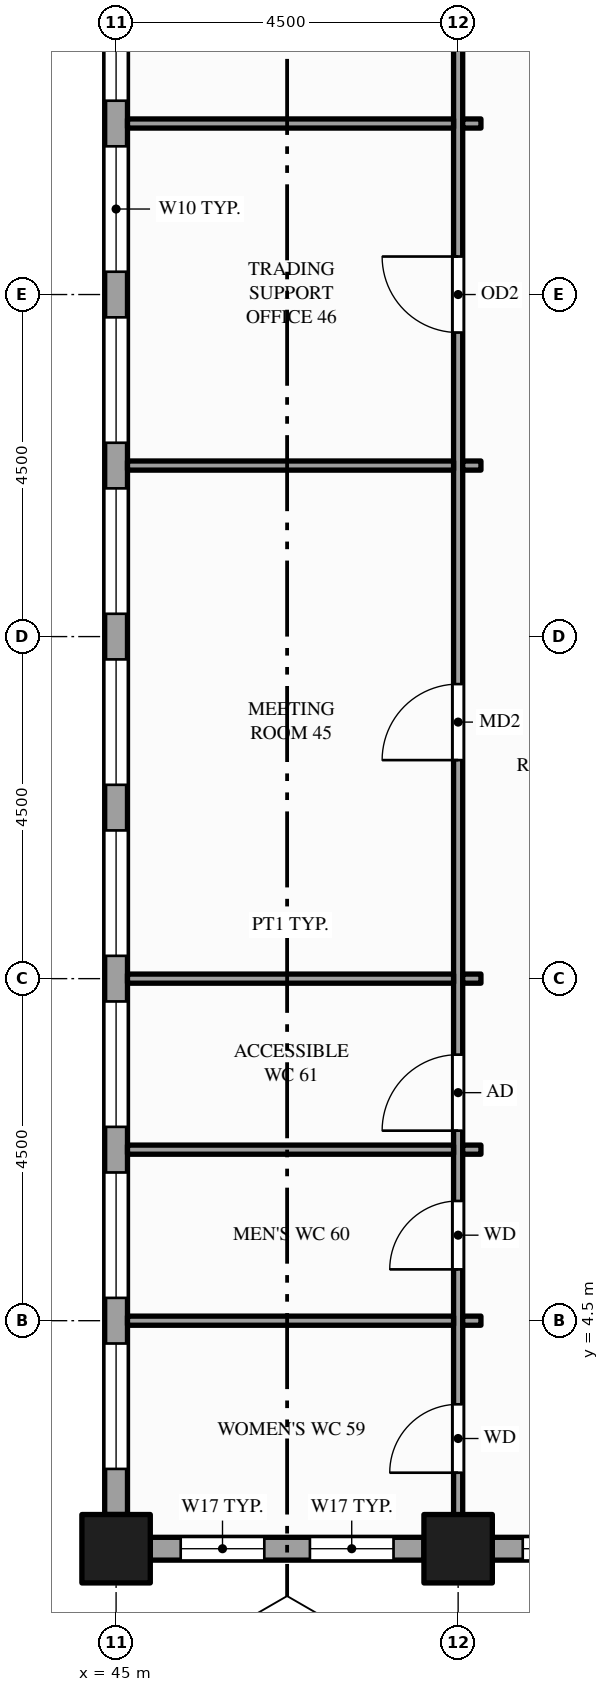
"""IFC4 building model, lengths in metres.
Left out: names, types, materials, properties, quantities, classifications, styles, units other than length and angle.
Written with IfcOpenShell. Run it as: python <this file> out.ifc"""

import sys

from ifc_helpers import new_model, si_unit, direction, frame, frame_2d, origin, origin_2d, place, context, subcontext, project, spatial, rectangle, hollow_rectangle, extrude, element, fill, save


model = new_model("IFC4")
c1 = context("Model", 3, precision=1e-05, world=origin(), true_north=direction((0.0, 1.0)))
c2 = subcontext(c1, "Body", "Model", "MODEL_VIEW")
j1 = project(units=[si_unit("LENGTHUNIT", "METRE"), si_unit("PLANEANGLEUNIT", "RADIAN")], contexts=[c1])
p1 = place(None, origin())
s1 = spatial("IfcSite", under=j1, at=p1, CompositionType="ELEMENT")
p2 = place(p1, origin())
s2 = spatial("IfcBuilding", under=s1, at=p2, CompositionType="ELEMENT")
p3 = place(p2, frame((0.0, 0.0, 139.0)))
s3 = spatial("IfcBuildingStorey", under=s2, at=p3, CompositionType="ELEMENT", Elevation=139.0)
for number, where, z_axis, x_axis in (
    (1, (45.0, 1.5, -0.15), (0.0, 0.0, 1.0), (1.0, 0.0, 0.0)),
    (2, (49.5, 1.5, -0.15), (0.0, 0.0, 1.0), (1.0, 0.0, 0.0)),
):
    element("IfcColumn", number, at=place(p3, frame(where, z_axis=z_axis, x_axis=x_axis)), inside=s3, PredefinedType="COLUMN", context=c2, shape_type="SweptSolid", body=[
        extrude(hollow_rectangle(XDim=0.9, YDim=0.9, WallThickness=0.045, at=origin_2d()), origin(), (0.0, 0.0, 1.0), 4.0),
    ])
p4 = place(p3, frame((45.45, 1.5, 0.0), z_axis=(0.0, 0.0, 1.0), x_axis=(1.0, 0.0, 0.0)))
e3 = element("IfcWall", 3, at=p4, inside=s3, PredefinedType="STANDARD", context=c2, shape_type="SweptSolid", body=[
    extrude(rectangle(XDim=3.6, YDim=0.3, at=frame_2d((1.8, 0.0))), origin(), (0.0, 0.0, 1.0), 2.87),
])
p5 = place(p4, frame((0.4, 0.0, 0.9)))
e4 = element("IfcOpeningElement", 4, at=p5, cuts=e3, PredefinedType="OPENING", context=c2, shape_type="SweptSolid", body=[
    extrude(rectangle(XDim=1.1, YDim=1.75, at=frame_2d((0.55, 0.875))), frame((0.0, 0.16, 0.0), z_axis=(0.0, -1.0, 0.0), x_axis=(1.0, 0.0, 0.0)), (0.0, 0.0, 1.0), 0.32),
])
p6 = place(p4, frame((2.1, 0.0, 0.9)))
e5 = element("IfcOpeningElement", 5, at=p6, cuts=e3, PredefinedType="OPENING", context=c2, shape_type="SweptSolid", body=[
    extrude(rectangle(XDim=1.1, YDim=1.75, at=frame_2d((0.55, 0.875))), frame((0.0, 0.16, 0.0), z_axis=(0.0, -1.0, 0.0), x_axis=(1.0, 0.0, 0.0)), (0.0, 0.0, 1.0), 0.32),
])
p7 = place(p3, frame((49.95, 1.5, 0.0), z_axis=(0.0, 0.0, 1.0), x_axis=(1.0, 0.0, 0.0)))
e6 = element("IfcWall", 6, at=p7, inside=s3, PredefinedType="STANDARD", context=c2, shape_type="SweptSolid", body=[
    extrude(rectangle(XDim=4.05, YDim=0.3, at=frame_2d((2.025, 0.0))), origin(), (0.0, 0.0, 1.0), 2.87),
])
p8 = place(p7, frame((0.4, 0.0, 0.9)))
e7 = element("IfcOpeningElement", 7, at=p8, cuts=e6, PredefinedType="OPENING", context=c2, shape_type="SweptSolid", body=[
    extrude(rectangle(XDim=1.1, YDim=1.75, at=frame_2d((0.55, 0.875))), frame((0.0, 0.16, 0.0), z_axis=(0.0, -1.0, 0.0), x_axis=(1.0, 0.0, 0.0)), (0.0, 0.0, 1.0), 0.32),
])
p9 = place(p7, frame((2.1, 0.0, 0.9)))
e8 = element("IfcOpeningElement", 8, at=p9, cuts=e6, PredefinedType="OPENING", context=c2, shape_type="SweptSolid", body=[
    extrude(rectangle(XDim=1.55, YDim=1.75, at=frame_2d((0.775, 0.875))), frame((0.0, 0.16, 0.0), z_axis=(0.0, -1.0, 0.0), x_axis=(1.0, 0.0, 0.0)), (0.0, 0.0, 1.0), 0.32),
])
p10 = place(p3, frame((45.0, 23.55, 0.0), z_axis=(0.0, 0.0, 1.0), x_axis=(0.0, -1.0, 0.0)))
e9 = element("IfcWall", 9, at=p10, inside=s3, PredefinedType="STANDARD", context=c2, shape_type="SweptSolid", body=[
    extrude(rectangle(XDim=21.6, YDim=0.3, at=frame_2d((10.8, 0.0))), origin(), (0.0, 0.0, 1.0), 3.149),
])
p11 = place(p10, frame((1.35, 0.0, 0.9)))
e10 = element("IfcOpeningElement", 10, at=p11, cuts=e9, PredefinedType="OPENING", context=c2, shape_type="SweptSolid", body=[
    extrude(rectangle(XDim=1.65, YDim=2.0, at=frame_2d((0.825, 1.0))), frame((0.0, 0.16, 0.0), z_axis=(0.0, -1.0, 0.0), x_axis=(1.0, 0.0, 0.0)), (0.0, 0.0, 1.0), 0.32),
])
p12 = place(p10, frame((3.6, 0.0, 0.9)))
e11 = element("IfcOpeningElement", 11, at=p12, cuts=e9, PredefinedType="OPENING", context=c2, shape_type="SweptSolid", body=[
    extrude(rectangle(XDim=1.65, YDim=2.0, at=frame_2d((0.825, 1.0))), frame((0.0, 0.16, 0.0), z_axis=(0.0, -1.0, 0.0), x_axis=(1.0, 0.0, 0.0)), (0.0, 0.0, 1.0), 0.32),
])
p13 = place(p10, frame((5.85, 0.0, 0.9)))
e12 = element("IfcOpeningElement", 12, at=p13, cuts=e9, PredefinedType="OPENING", context=c2, shape_type="SweptSolid", body=[
    extrude(rectangle(XDim=1.65, YDim=2.0, at=frame_2d((0.825, 1.0))), frame((0.0, 0.16, 0.0), z_axis=(0.0, -1.0, 0.0), x_axis=(1.0, 0.0, 0.0)), (0.0, 0.0, 1.0), 0.32),
])
p14 = place(p10, frame((8.1, 0.0, 0.9)))
e13 = element("IfcOpeningElement", 13, at=p14, cuts=e9, PredefinedType="OPENING", context=c2, shape_type="SweptSolid", body=[
    extrude(rectangle(XDim=1.65, YDim=2.0, at=frame_2d((0.825, 1.0))), frame((0.0, 0.16, 0.0), z_axis=(0.0, -1.0, 0.0), x_axis=(1.0, 0.0, 0.0)), (0.0, 0.0, 1.0), 0.32),
])
p15 = place(p10, frame((10.35, 0.0, 0.9)))
e14 = element("IfcOpeningElement", 14, at=p15, cuts=e9, PredefinedType="OPENING", context=c2, shape_type="SweptSolid", body=[
    extrude(rectangle(XDim=1.65, YDim=2.0, at=frame_2d((0.825, 1.0))), frame((0.0, 0.16, 0.0), z_axis=(0.0, -1.0, 0.0), x_axis=(1.0, 0.0, 0.0)), (0.0, 0.0, 1.0), 0.32),
])
p16 = place(p10, frame((12.6, 0.0, 0.9)))
e15 = element("IfcOpeningElement", 15, at=p16, cuts=e9, PredefinedType="OPENING", context=c2, shape_type="SweptSolid", body=[
    extrude(rectangle(XDim=1.65, YDim=2.0, at=frame_2d((0.825, 1.0))), frame((0.0, 0.16, 0.0), z_axis=(0.0, -1.0, 0.0), x_axis=(1.0, 0.0, 0.0)), (0.0, 0.0, 1.0), 0.32),
])
p17 = place(p10, frame((14.85, 0.0, 0.9)))
e16 = element("IfcOpeningElement", 16, at=p17, cuts=e9, PredefinedType="OPENING", context=c2, shape_type="SweptSolid", body=[
    extrude(rectangle(XDim=1.65, YDim=2.0, at=frame_2d((0.825, 1.0))), frame((0.0, 0.16, 0.0), z_axis=(0.0, -1.0, 0.0), x_axis=(1.0, 0.0, 0.0)), (0.0, 0.0, 1.0), 0.32),
])
p18 = place(p10, frame((17.1, 0.0, 0.9)))
e17 = element("IfcOpeningElement", 17, at=p18, cuts=e9, PredefinedType="OPENING", context=c2, shape_type="SweptSolid", body=[
    extrude(rectangle(XDim=1.65, YDim=2.0, at=frame_2d((0.825, 1.0))), frame((0.0, 0.16, 0.0), z_axis=(0.0, -1.0, 0.0), x_axis=(1.0, 0.0, 0.0)), (0.0, 0.0, 1.0), 0.32),
])
p19 = place(p10, frame((19.35, 0.0, 0.9)))
e18 = element("IfcOpeningElement", 18, at=p19, cuts=e9, PredefinedType="OPENING", context=c2, shape_type="SweptSolid", body=[
    extrude(rectangle(XDim=1.65, YDim=2.0, at=frame_2d((0.825, 1.0))), frame((0.0, 0.16, 0.0), z_axis=(0.0, -1.0, 0.0), x_axis=(1.0, 0.0, 0.0)), (0.0, 0.0, 1.0), 0.32),
])
p20 = place(p3, frame((49.5, 1.65, 0.0), z_axis=(0.0, 0.0, 1.0), x_axis=(0.0, 1.0, 0.0)))
e19 = element("IfcWall", 19, at=p20, inside=s3, PredefinedType="PARTITIONING", context=c2, shape_type="SweptSolid", body=[
    extrude(rectangle(XDim=22.2, YDim=0.12, at=frame_2d((11.1, 0.0))), origin(), (0.0, 0.0, 1.0), 2.87),
])
p21 = place(p20, frame((0.85, 0.0, 0.0)))
e20 = element("IfcOpeningElement", 20, at=p21, cuts=e19, PredefinedType="OPENING", context=c2, shape_type="SweptSolid", body=[
    extrude(rectangle(XDim=0.9, YDim=2.1, at=frame_2d((0.45, 1.05))), frame((0.0, 0.07, 0.0), z_axis=(0.0, -1.0, 0.0), x_axis=(1.0, 0.0, 0.0)), (0.0, 0.0, 1.0), 0.14),
])
p22 = place(p20, frame((3.525, 0.0, 0.0)))
e21 = element("IfcOpeningElement", 21, at=p22, cuts=e19, PredefinedType="OPENING", context=c2, shape_type="SweptSolid", body=[
    extrude(rectangle(XDim=0.9, YDim=2.1, at=frame_2d((0.45, 1.05))), frame((0.0, 0.07, 0.0), z_axis=(0.0, -1.0, 0.0), x_axis=(1.0, 0.0, 0.0)), (0.0, 0.0, 1.0), 0.14),
])
p23 = place(p20, frame((5.35, 0.0, 0.0)))
e22 = element("IfcOpeningElement", 22, at=p23, cuts=e19, PredefinedType="OPENING", context=c2, shape_type="SweptSolid", body=[
    extrude(rectangle(XDim=1.0, YDim=2.1, at=frame_2d((0.5, 1.05))), frame((0.0, 0.07, 0.0), z_axis=(0.0, -1.0, 0.0), x_axis=(1.0, 0.0, 0.0)), (0.0, 0.0, 1.0), 0.14),
])
p24 = place(p20, frame((10.225, 0.0, 0.0)))
e23 = element("IfcOpeningElement", 23, at=p24, cuts=e19, PredefinedType="OPENING", context=c2, shape_type="SweptSolid", body=[
    extrude(rectangle(XDim=1.0, YDim=2.1, at=frame_2d((0.5, 1.05))), frame((0.0, 0.07, 0.0), z_axis=(0.0, -1.0, 0.0), x_axis=(1.0, 0.0, 0.0)), (0.0, 0.0, 1.0), 0.14),
])
p25 = place(p20, frame((15.85, 0.0, 0.0)))
e24 = element("IfcOpeningElement", 24, at=p25, cuts=e19, PredefinedType="OPENING", context=c2, shape_type="SweptSolid", body=[
    extrude(rectangle(XDim=1.0, YDim=2.1, at=frame_2d((0.5, 1.05))), frame((0.0, 0.07, 0.0), z_axis=(0.0, -1.0, 0.0), x_axis=(1.0, 0.0, 0.0)), (0.0, 0.0, 1.0), 0.14),
])
p26 = place(p20, frame((19.92, 0.0, 0.0)))
e25 = element("IfcOpeningElement", 25, at=p26, cuts=e19, PredefinedType="OPENING", context=c2, shape_type="SweptSolid", body=[
    extrude(rectangle(XDim=1.0, YDim=2.1, at=frame_2d((0.5, 1.05))), frame((0.0, 0.07, 0.0), z_axis=(0.0, -1.0, 0.0), x_axis=(1.0, 0.0, 0.0)), (0.0, 0.0, 1.0), 0.14),
])
p27 = place(p3, frame((45.15, 4.5, 0.0), z_axis=(0.0, 0.0, 1.0), x_axis=(1.0, 0.0, 0.0)))
e26 = element("IfcWall", 26, at=p27, inside=s3, PredefinedType="PARTITIONING", context=c2, shape_type="SweptSolid", body=[
    extrude(rectangle(XDim=4.29, YDim=0.12, at=frame_2d((2.145, 0.0))), origin(), (0.0, 0.0, 1.0), 2.87),
])
p28 = place(p3, frame((49.56, 4.5, 0.0), z_axis=(0.0, 0.0, 1.0), x_axis=(1.0, 0.0, 0.0)))
e27 = element("IfcWall", 27, at=p28, inside=s3, PredefinedType="PARTITIONING", context=c2, shape_type="SweptSolid", body=[
    extrude(rectangle(XDim=0.24, YDim=0.12, at=frame_2d((0.12, 0.0))), origin(), (0.0, 0.0, 1.0), 2.87),
])
p29 = place(p3, frame((45.15, 6.75, 0.0), z_axis=(0.0, 0.0, 1.0), x_axis=(1.0, 0.0, 0.0)))
e28 = element("IfcWall", 28, at=p29, inside=s3, PredefinedType="PARTITIONING", context=c2, shape_type="SweptSolid", body=[
    extrude(rectangle(XDim=4.29, YDim=0.12, at=frame_2d((2.145, 0.0))), origin(), (0.0, 0.0, 1.0), 2.87),
])
p30 = place(p3, frame((49.56, 6.75, 0.0), z_axis=(0.0, 0.0, 1.0), x_axis=(1.0, 0.0, 0.0)))
e29 = element("IfcWall", 29, at=p30, inside=s3, PredefinedType="PARTITIONING", context=c2, shape_type="SweptSolid", body=[
    extrude(rectangle(XDim=0.24, YDim=0.12, at=frame_2d((0.12, 0.0))), origin(), (0.0, 0.0, 1.0), 2.87),
])
p31 = place(p3, frame((45.15, 9.0, 0.0), z_axis=(0.0, 0.0, 1.0), x_axis=(1.0, 0.0, 0.0)))
e30 = element("IfcWall", 30, at=p31, inside=s3, PredefinedType="PARTITIONING", context=c2, shape_type="SweptSolid", body=[
    extrude(rectangle(XDim=4.29, YDim=0.12, at=frame_2d((2.145, 0.0))), origin(), (0.0, 0.0, 1.0), 2.87),
])
p32 = place(p3, frame((49.56, 9.0, 0.0), z_axis=(0.0, 0.0, 1.0), x_axis=(1.0, 0.0, 0.0)))
e31 = element("IfcWall", 31, at=p32, inside=s3, PredefinedType="PARTITIONING", context=c2, shape_type="SweptSolid", body=[
    extrude(rectangle(XDim=0.24, YDim=0.12, at=frame_2d((0.12, 0.0))), origin(), (0.0, 0.0, 1.0), 2.87),
])
p33 = place(p3, frame((45.15, 15.75, 0.0), z_axis=(0.0, 0.0, 1.0), x_axis=(1.0, 0.0, 0.0)))
e32 = element("IfcWall", 32, at=p33, inside=s3, PredefinedType="PARTITIONING", context=c2, shape_type="SweptSolid", body=[
    extrude(rectangle(XDim=4.29, YDim=0.12, at=frame_2d((2.145, 0.0))), origin(), (0.0, 0.0, 1.0), 2.87),
])
p34 = place(p3, frame((49.56, 15.75, 0.0), z_axis=(0.0, 0.0, 1.0), x_axis=(1.0, 0.0, 0.0)))
e33 = element("IfcWall", 33, at=p34, inside=s3, PredefinedType="PARTITIONING", context=c2, shape_type="SweptSolid", body=[
    extrude(rectangle(XDim=0.24, YDim=0.12, at=frame_2d((0.12, 0.0))), origin(), (0.0, 0.0, 1.0), 2.87),
])
p35 = place(p3, frame((45.15, 20.25, 0.0), z_axis=(0.0, 0.0, 1.0), x_axis=(1.0, 0.0, 0.0)))
e34 = element("IfcWall", 34, at=p35, inside=s3, PredefinedType="PARTITIONING", context=c2, shape_type="SweptSolid", body=[
    extrude(rectangle(XDim=4.29, YDim=0.12, at=frame_2d((2.145, 0.0))), origin(), (0.0, 0.0, 1.0), 2.87),
])
p36 = place(p3, frame((49.56, 20.25, 0.0), z_axis=(0.0, 0.0, 1.0), x_axis=(1.0, 0.0, 0.0)))
e35 = element("IfcWall", 35, at=p36, inside=s3, PredefinedType="PARTITIONING", context=c2, shape_type="SweptSolid", body=[
    extrude(rectangle(XDim=0.24, YDim=0.12, at=frame_2d((0.12, 0.0))), origin(), (0.0, 0.0, 1.0), 2.87),
])
p37 = place(p5, origin())
e36 = element("IfcWindow", 36, at=p37, inside=s3, PartitioningType="SINGLE_PANEL", PredefinedType="WINDOW", context=c2, shape_type="SweptSolid", body=[
    extrude(rectangle(XDim=1.1, YDim=1.75, at=frame_2d((0.55, 0.875))), frame((0.0, 0.03, 0.0), z_axis=(0.0, -1.0, 0.0), x_axis=(1.0, 0.0, 0.0)), (0.0, 0.0, 1.0), 0.06),
])
fill(e4, e36)
p38 = place(p6, origin())
e37 = element("IfcWindow", 37, at=p38, inside=s3, PartitioningType="SINGLE_PANEL", PredefinedType="WINDOW", context=c2, shape_type="SweptSolid", body=[
    extrude(rectangle(XDim=1.1, YDim=1.75, at=frame_2d((0.55, 0.875))), frame((0.0, 0.03, 0.0), z_axis=(0.0, -1.0, 0.0), x_axis=(1.0, 0.0, 0.0)), (0.0, 0.0, 1.0), 0.06),
])
fill(e5, e37)
p39 = place(p8, origin())
e38 = element("IfcWindow", 38, at=p39, inside=s3, PartitioningType="SINGLE_PANEL", PredefinedType="WINDOW", context=c2, shape_type="SweptSolid", body=[
    extrude(rectangle(XDim=1.1, YDim=1.75, at=frame_2d((0.55, 0.875))), frame((0.0, 0.03, 0.0), z_axis=(0.0, -1.0, 0.0), x_axis=(1.0, 0.0, 0.0)), (0.0, 0.0, 1.0), 0.06),
])
fill(e7, e38)
p40 = place(p11, origin())
e39 = element("IfcWindow", 39, at=p40, inside=s3, PartitioningType="SINGLE_PANEL", PredefinedType="WINDOW", context=c2, shape_type="SweptSolid", body=[
    extrude(rectangle(XDim=1.65, YDim=2.0, at=frame_2d((0.825, 1.0))), frame((0.0, 0.03, 0.0), z_axis=(0.0, -1.0, 0.0), x_axis=(1.0, 0.0, 0.0)), (0.0, 0.0, 1.0), 0.06),
])
fill(e10, e39)
p41 = place(p12, origin())
e40 = element("IfcWindow", 40, at=p41, inside=s3, PartitioningType="SINGLE_PANEL", PredefinedType="WINDOW", context=c2, shape_type="SweptSolid", body=[
    extrude(rectangle(XDim=1.65, YDim=2.0, at=frame_2d((0.825, 1.0))), frame((0.0, 0.03, 0.0), z_axis=(0.0, -1.0, 0.0), x_axis=(1.0, 0.0, 0.0)), (0.0, 0.0, 1.0), 0.06),
])
fill(e11, e40)
p42 = place(p13, origin())
e41 = element("IfcWindow", 41, at=p42, inside=s3, PartitioningType="SINGLE_PANEL", PredefinedType="WINDOW", context=c2, shape_type="SweptSolid", body=[
    extrude(rectangle(XDim=1.65, YDim=2.0, at=frame_2d((0.825, 1.0))), frame((0.0, 0.03, 0.0), z_axis=(0.0, -1.0, 0.0), x_axis=(1.0, 0.0, 0.0)), (0.0, 0.0, 1.0), 0.06),
])
fill(e12, e41)
p43 = place(p14, origin())
e42 = element("IfcWindow", 42, at=p43, inside=s3, PartitioningType="SINGLE_PANEL", PredefinedType="WINDOW", context=c2, shape_type="SweptSolid", body=[
    extrude(rectangle(XDim=1.65, YDim=2.0, at=frame_2d((0.825, 1.0))), frame((0.0, 0.03, 0.0), z_axis=(0.0, -1.0, 0.0), x_axis=(1.0, 0.0, 0.0)), (0.0, 0.0, 1.0), 0.06),
])
fill(e13, e42)
p44 = place(p15, origin())
e43 = element("IfcWindow", 43, at=p44, inside=s3, PartitioningType="SINGLE_PANEL", PredefinedType="WINDOW", context=c2, shape_type="SweptSolid", body=[
    extrude(rectangle(XDim=1.65, YDim=2.0, at=frame_2d((0.825, 1.0))), frame((0.0, 0.03, 0.0), z_axis=(0.0, -1.0, 0.0), x_axis=(1.0, 0.0, 0.0)), (0.0, 0.0, 1.0), 0.06),
])
fill(e14, e43)
p45 = place(p16, origin())
e44 = element("IfcWindow", 44, at=p45, inside=s3, PartitioningType="SINGLE_PANEL", PredefinedType="WINDOW", context=c2, shape_type="SweptSolid", body=[
    extrude(rectangle(XDim=1.65, YDim=2.0, at=frame_2d((0.825, 1.0))), frame((0.0, 0.03, 0.0), z_axis=(0.0, -1.0, 0.0), x_axis=(1.0, 0.0, 0.0)), (0.0, 0.0, 1.0), 0.06),
])
fill(e15, e44)
p46 = place(p17, origin())
e45 = element("IfcWindow", 45, at=p46, inside=s3, PartitioningType="SINGLE_PANEL", PredefinedType="WINDOW", context=c2, shape_type="SweptSolid", body=[
    extrude(rectangle(XDim=1.65, YDim=2.0, at=frame_2d((0.825, 1.0))), frame((0.0, 0.03, 0.0), z_axis=(0.0, -1.0, 0.0), x_axis=(1.0, 0.0, 0.0)), (0.0, 0.0, 1.0), 0.06),
])
fill(e16, e45)
p47 = place(p18, origin())
e46 = element("IfcWindow", 46, at=p47, inside=s3, PartitioningType="SINGLE_PANEL", PredefinedType="WINDOW", context=c2, shape_type="SweptSolid", body=[
    extrude(rectangle(XDim=1.65, YDim=2.0, at=frame_2d((0.825, 1.0))), frame((0.0, 0.03, 0.0), z_axis=(0.0, -1.0, 0.0), x_axis=(1.0, 0.0, 0.0)), (0.0, 0.0, 1.0), 0.06),
])
fill(e17, e46)
p48 = place(p19, origin())
e47 = element("IfcWindow", 47, at=p48, inside=s3, PartitioningType="SINGLE_PANEL", PredefinedType="WINDOW", context=c2, shape_type="SweptSolid", body=[
    extrude(rectangle(XDim=1.65, YDim=2.0, at=frame_2d((0.825, 1.0))), frame((0.0, 0.03, 0.0), z_axis=(0.0, -1.0, 0.0), x_axis=(1.0, 0.0, 0.0)), (0.0, 0.0, 1.0), 0.06),
])
fill(e18, e47)
p49 = place(p21, origin())
e48 = element("IfcDoor", 48, at=p49, inside=s3, OperationType="SINGLE_SWING_LEFT", PredefinedType="DOOR", context=c2, shape_type="SweptSolid", body=[
    extrude(rectangle(XDim=0.9, YDim=2.1, at=frame_2d((0.45, 1.05))), frame((0.0, 0.025, 0.0), z_axis=(0.0, -1.0, 0.0), x_axis=(1.0, 0.0, 0.0)), (0.0, 0.0, 1.0), 0.05),
])
fill(e20, e48)
p50 = place(p22, origin())
e49 = element("IfcDoor", 49, at=p50, inside=s3, OperationType="SINGLE_SWING_LEFT", PredefinedType="DOOR", context=c2, shape_type="SweptSolid", body=[
    extrude(rectangle(XDim=0.9, YDim=2.1, at=frame_2d((0.45, 1.05))), frame((0.0, 0.025, 0.0), z_axis=(0.0, -1.0, 0.0), x_axis=(1.0, 0.0, 0.0)), (0.0, 0.0, 1.0), 0.05),
])
fill(e21, e49)
p51 = place(p23, origin())
e50 = element("IfcDoor", 50, at=p51, inside=s3, OperationType="SINGLE_SWING_LEFT", PredefinedType="DOOR", context=c2, shape_type="SweptSolid", body=[
    extrude(rectangle(XDim=1.0, YDim=2.1, at=frame_2d((0.5, 1.05))), frame((0.0, 0.025, 0.0), z_axis=(0.0, -1.0, 0.0), x_axis=(1.0, 0.0, 0.0)), (0.0, 0.0, 1.0), 0.05),
])
fill(e22, e50)
p52 = place(p24, origin())
e51 = element("IfcDoor", 51, at=p52, inside=s3, OperationType="SINGLE_SWING_LEFT", PredefinedType="DOOR", context=c2, shape_type="SweptSolid", body=[
    extrude(rectangle(XDim=1.0, YDim=2.1, at=frame_2d((0.5, 1.05))), frame((0.0, 0.025, 0.0), z_axis=(0.0, -1.0, 0.0), x_axis=(1.0, 0.0, 0.0)), (0.0, 0.0, 1.0), 0.05),
])
fill(e23, e51)
p53 = place(p25, origin())
e52 = element("IfcDoor", 52, at=p53, inside=s3, OperationType="SINGLE_SWING_RIGHT", PredefinedType="DOOR", context=c2, shape_type="SweptSolid", body=[
    extrude(rectangle(XDim=1.0, YDim=2.1, at=frame_2d((0.5, 1.05))), frame((0.0, 0.025, 0.0), z_axis=(0.0, -1.0, 0.0), x_axis=(1.0, 0.0, 0.0)), (0.0, 0.0, 1.0), 0.05),
])
fill(e24, e52)
save(model, sys.argv[1])
